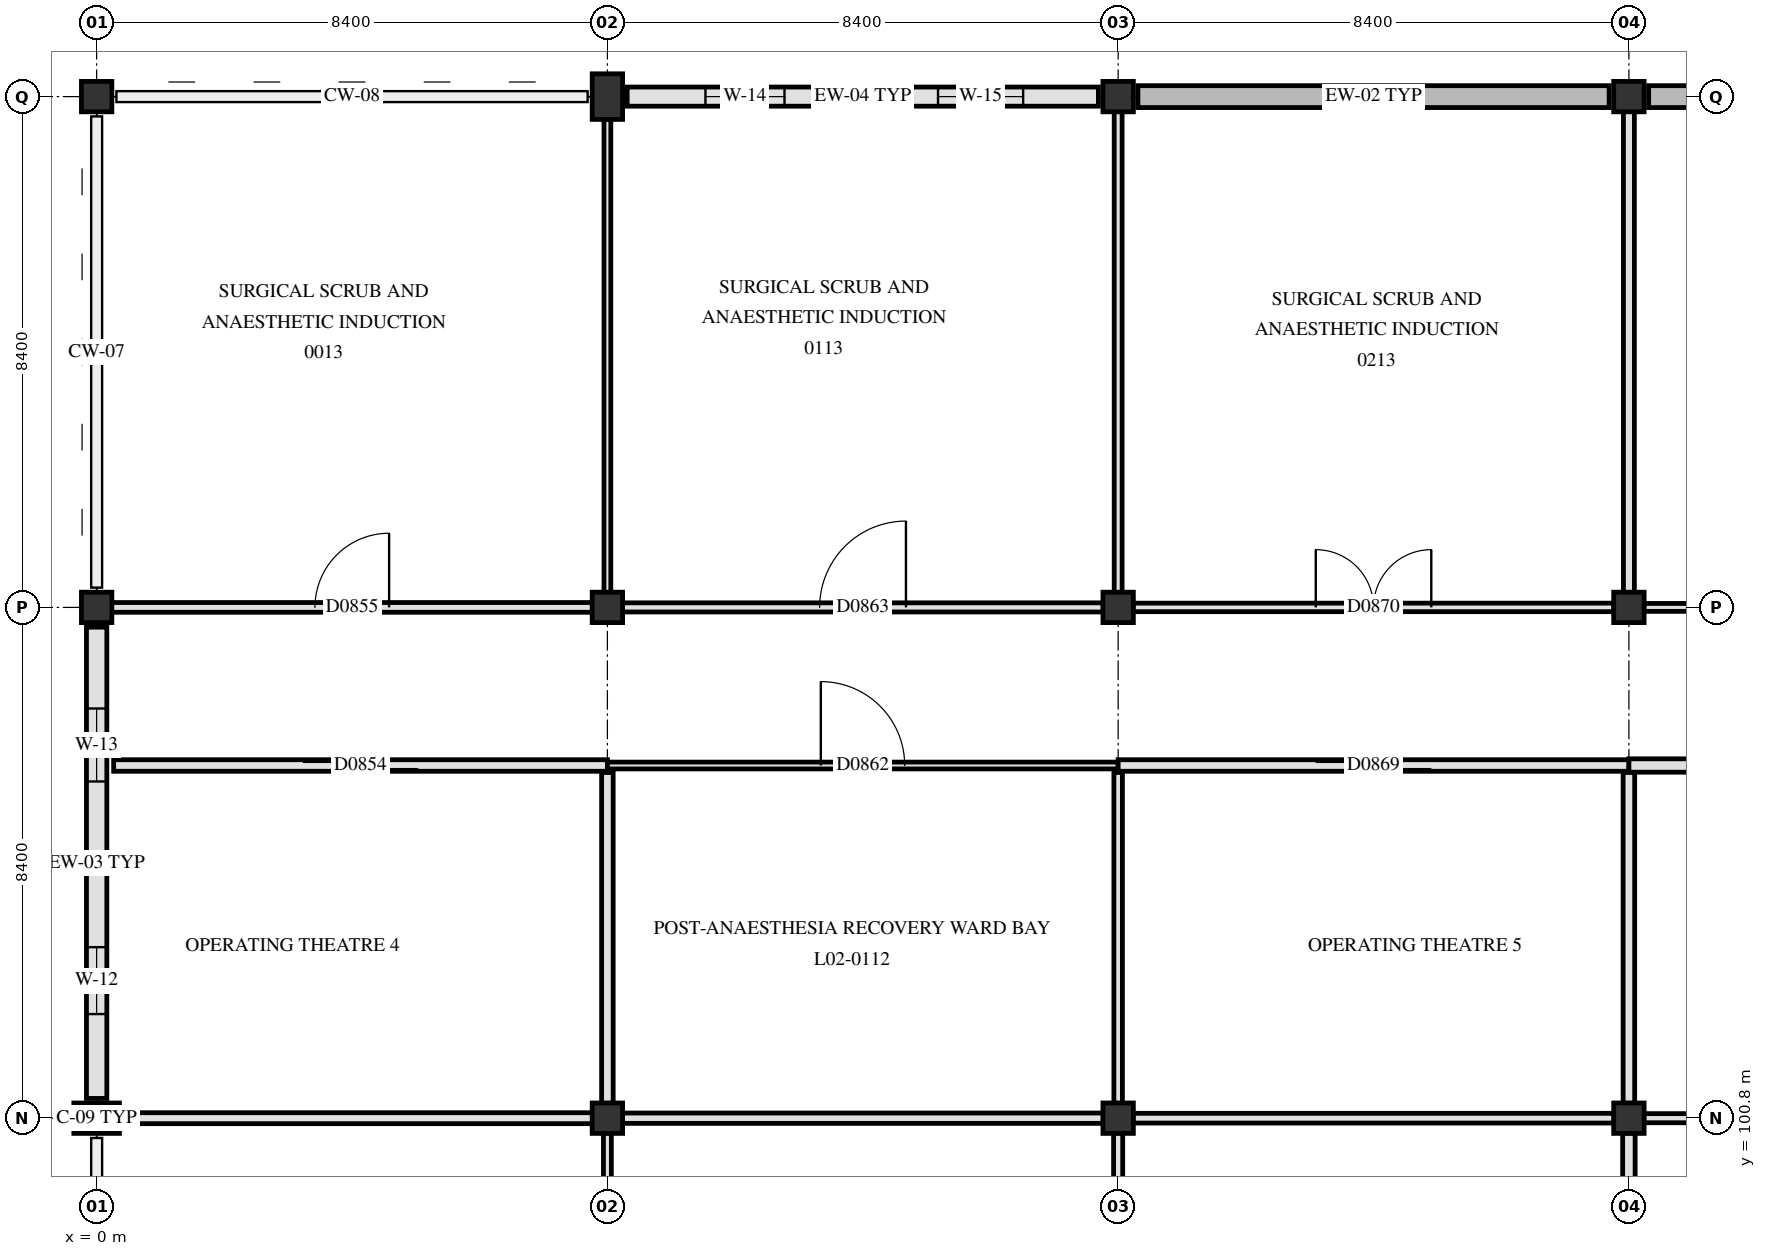
"""IFC4 building model, lengths in metres.
Left out: names, types, materials, properties, quantities, classifications, styles, units other than length and angle.
Written with IfcOpenShell. Run it as: python <this file> out.ifc"""

import sys

from ifc_helpers import new_model, si_unit, direction, frame, frame_2d, origin, origin_2d, place, context, subcontext, project, spatial, rectangle, extrude, element, fill, save


model = new_model("IFC4")
c1 = context("Model", 3, precision=1e-05, world=origin(), true_north=direction((0.0, 1.0)))
c2 = subcontext(c1, "Body", "Model", "MODEL_VIEW")
j1 = project(units=[si_unit("LENGTHUNIT", "METRE"), si_unit("PLANEANGLEUNIT", "RADIAN")], contexts=[c1])
p1 = place(None, origin())
s1 = spatial("IfcSite", under=j1, at=p1, CompositionType="ELEMENT")
p2 = place(p1, origin())
s2 = spatial("IfcBuilding", under=s1, at=p2, CompositionType="ELEMENT")
p3 = place(p2, frame((0.0, 0.0, 9.3)))
s3 = spatial("IfcBuildingStorey", under=s2, at=p3, CompositionType="ELEMENT", Elevation=9.3)
p4 = place(p3, frame((0.0, 100.8, 0.0), z_axis=(0.0, 0.0, 1.0), x_axis=(0.0, 1.0, 0.0)))
e1 = element("IfcColumn", 1, at=p4, inside=s3, PredefinedType="PILASTER", context=c2, shape_type="SweptSolid", body=[
    extrude(rectangle(XDim=0.5, YDim=0.75, at=origin_2d()), origin(), (0.0, 0.0, 1.0), 5.1),
])
for number, where, z_axis, x_axis in (
    (2, (0.0, 109.2, 0.0), (0.0, 0.0, 1.0), (1.0, 0.0, 0.0)),
    (3, (0.0, 117.6, 0.0), (0.0, 0.0, 1.0), (1.0, 0.0, 0.0)),
    (4, (8.4, 100.8, 0.0), (0.0, 0.0, 1.0), (1.0, 0.0, 0.0)),
    (5, (8.4, 109.2, 0.0), (0.0, 0.0, 1.0), (1.0, 0.0, 0.0)),
):
    element("IfcColumn", number, at=place(p3, frame(where, z_axis=z_axis, x_axis=x_axis)), inside=s3, PredefinedType="COLUMN", context=c2, shape_type="SweptSolid", body=[
        extrude(rectangle(XDim=0.5, YDim=0.5, at=origin_2d()), origin(), (0.0, 0.0, 1.0), 5.1),
    ])
p5 = place(p3, frame((8.4, 117.6, 0.0), z_axis=(0.0, 0.0, 1.0), x_axis=(1.0, 0.0, 0.0)))
e6 = element("IfcColumn", 6, at=p5, inside=s3, PredefinedType="PILASTER", context=c2, shape_type="SweptSolid", body=[
    extrude(rectangle(XDim=0.5, YDim=0.75, at=origin_2d()), origin(), (0.0, 0.0, 1.0), 5.1),
])
for number, where, z_axis, x_axis in (
    (7, (16.8, 100.8, 0.0), (0.0, 0.0, 1.0), (1.0, 0.0, 0.0)),
    (8, (16.8, 109.2, 0.0), (0.0, 0.0, 1.0), (1.0, 0.0, 0.0)),
    (9, (16.8, 117.6, 0.0), (0.0, 0.0, 1.0), (1.0, 0.0, 0.0)),
    (10, (25.2, 100.8, 0.0), (0.0, 0.0, 1.0), (1.0, 0.0, 0.0)),
    (11, (25.2, 109.2, 0.0), (0.0, 0.0, 1.0), (1.0, 0.0, 0.0)),
    (12, (25.2, 117.6, 0.0), (0.0, 0.0, 1.0), (1.0, 0.0, 0.0)),
):
    element("IfcColumn", number, at=place(p3, frame(where, z_axis=z_axis, x_axis=x_axis)), inside=s3, PredefinedType="COLUMN", context=c2, shape_type="SweptSolid", body=[
        extrude(rectangle(XDim=0.5, YDim=0.5, at=origin_2d()), origin(), (0.0, 0.0, 1.0), 5.1),
    ])
p6 = place(p3, frame((0.0, 101.125, 0.0), z_axis=(0.0, 0.0, 1.0), x_axis=(0.0, 1.0, 0.0)))
e13 = element("IfcWall", 13, at=p6, inside=s3, PredefinedType="SOLIDWALL", context=c2, shape_type="SweptSolid", body=[
    extrude(rectangle(XDim=7.75, YDim=0.335, at=frame_2d((3.875, 0.0))), origin(), (0.0, 0.0, 1.0), 4.07),
])
p7 = place(p6, frame((1.387, 0.0, 0.85)))
e14 = element("IfcOpeningElement", 14, at=p7, cuts=e13, PredefinedType="OPENING", context=c2, shape_type="SweptSolid", body=[
    extrude(rectangle(XDim=1.1, YDim=1.42, at=frame_2d((0.55, 0.71))), frame((0.0, 0.177, 0.0), z_axis=(0.0, -1.0, 0.0), x_axis=(1.0, 0.0, 0.0)), (0.0, 0.0, 1.0), 0.355),
])
p8 = place(p6, frame((5.212, 0.0, 0.85)))
e15 = element("IfcOpeningElement", 15, at=p8, cuts=e13, PredefinedType="OPENING", context=c2, shape_type="SweptSolid", body=[
    extrude(rectangle(XDim=1.2, YDim=1.42, at=frame_2d((0.6, 0.71))), frame((0.0, 0.177, 0.0), z_axis=(0.0, -1.0, 0.0), x_axis=(1.0, 0.0, 0.0)), (0.0, 0.0, 1.0), 0.355),
])
p9 = place(p3, frame((8.725, 117.6, 0.0), z_axis=(0.0, 0.0, 1.0), x_axis=(1.0, 0.0, 0.0)))
e16 = element("IfcWall", 16, at=p9, inside=s3, PredefinedType="SOLIDWALL", context=c2, shape_type="SweptSolid", body=[
    extrude(rectangle(XDim=7.75, YDim=0.315, at=frame_2d((3.875, 0.0))), origin(), (0.0, 0.0, 1.0), 4.07),
])
p10 = place(p9, frame((1.288, 0.0, 0.85)))
e17 = element("IfcOpeningElement", 17, at=p10, cuts=e16, PredefinedType="OPENING", context=c2, shape_type="SweptSolid", body=[
    extrude(rectangle(XDim=1.3, YDim=1.42, at=frame_2d((0.65, 0.71))), frame((0.0, 0.167, 0.0), z_axis=(0.0, -1.0, 0.0), x_axis=(1.0, 0.0, 0.0)), (0.0, 0.0, 1.0), 0.335),
])
p11 = place(p9, frame((5.113, 0.0, 0.85)))
e18 = element("IfcOpeningElement", 18, at=p11, cuts=e16, PredefinedType="OPENING", context=c2, shape_type="SweptSolid", body=[
    extrude(rectangle(XDim=1.4, YDim=1.42, at=frame_2d((0.7, 0.71))), frame((0.0, 0.167, 0.0), z_axis=(0.0, -1.0, 0.0), x_axis=(1.0, 0.0, 0.0)), (0.0, 0.0, 1.0), 0.335),
])
for number, where, z_axis, x_axis in (
    (19, (17.125, 117.6, 0.0), (0.0, 0.0, 1.0), (1.0, 0.0, 0.0)),
    (20, (25.525, 117.6, 0.0), (0.0, 0.0, 1.0), (1.0, 0.0, 0.0)),
):
    element("IfcWall", number, at=place(p3, frame(where, z_axis=z_axis, x_axis=x_axis)), inside=s3, PredefinedType="SOLIDWALL", context=c2, shape_type="SweptSolid", body=[
        extrude(rectangle(XDim=7.75, YDim=0.36, at=frame_2d((3.875, 0.0))), origin(), (0.0, 0.0, 1.0), 4.78),
    ])
p12 = place(p3, frame((0.245, 100.8, 0.0), z_axis=(0.0, 0.0, 1.0), x_axis=(1.0, 0.0, 0.0)))
e21 = element("IfcWall", 21, at=p12, inside=s3, PredefinedType="PARTITIONING", context=c2, shape_type="SweptSolid", body=[
    extrude(rectangle(XDim=7.91, YDim=0.18, at=frame_2d((3.955, 0.0))), origin(), (0.0, 0.0, 1.0), 4.02),
])
p13 = place(p3, frame((8.645, 100.8, 0.0), z_axis=(0.0, 0.0, 1.0), x_axis=(1.0, 0.0, 0.0)))
e22 = element("IfcWall", 22, at=p13, inside=s3, PredefinedType="PARTITIONING", context=c2, shape_type="SweptSolid", body=[
    extrude(rectangle(XDim=7.91, YDim=0.17, at=frame_2d((3.955, 0.0))), origin(), (0.0, 0.0, 1.0), 4.02),
])
p14 = place(p3, frame((17.045, 100.8, 0.0), z_axis=(0.0, 0.0, 1.0), x_axis=(1.0, 0.0, 0.0)))
e23 = element("IfcWall", 23, at=p14, inside=s3, PredefinedType="PARTITIONING", context=c2, shape_type="SweptSolid", body=[
    extrude(rectangle(XDim=7.91, YDim=0.16, at=frame_2d((3.955, 0.0))), origin(), (0.0, 0.0, 1.0), 4.02),
])
p15 = place(p3, frame((25.445, 100.8, 0.0), z_axis=(0.0, 0.0, 1.0), x_axis=(1.0, 0.0, 0.0)))
e24 = element("IfcWall", 24, at=p15, inside=s3, PredefinedType="PARTITIONING", context=c2, shape_type="SweptSolid", body=[
    extrude(rectangle(XDim=7.91, YDim=0.15, at=frame_2d((3.955, 0.0))), origin(), (0.0, 0.0, 1.0), 4.02),
])
p16 = place(p3, frame((0.28, 106.6, 0.0), z_axis=(0.0, 0.0, 1.0), x_axis=(1.0, 0.0, 0.0)))
e25 = element("IfcWall", 25, at=p16, inside=s3, PredefinedType="PARTITIONING", context=c2, shape_type="SweptSolid", body=[
    extrude(rectangle(XDim=8.12, YDim=0.19, at=frame_2d((4.06, 0.0))), origin(), (0.0, 0.0, 1.0), 4.17),
])
p17 = place(p16, frame((3.11, 0.0, 0.0)))
e26 = element("IfcOpeningElement", 26, at=p17, cuts=e25, PredefinedType="OPENING", context=c2, shape_type="SweptSolid", body=[
    extrude(rectangle(XDim=1.9, YDim=2.3, at=frame_2d((0.95, 1.15))), frame((0.0, 0.105, 0.0), z_axis=(0.0, -1.0, 0.0), x_axis=(1.0, 0.0, 0.0)), (0.0, 0.0, 1.0), 0.21),
])
p18 = place(p3, frame((8.4, 106.6, 0.0), z_axis=(0.0, 0.0, 1.0), x_axis=(1.0, 0.0, 0.0)))
e27 = element("IfcWall", 27, at=p18, inside=s3, PredefinedType="PARTITIONING", context=c2, shape_type="SweptSolid", body=[
    extrude(rectangle(XDim=8.4, YDim=0.112, at=frame_2d((4.2, 0.0))), origin(), (0.0, 0.0, 1.0), 4.17),
])
p19 = place(p18, frame((3.51, 0.0, 0.0)))
e28 = element("IfcOpeningElement", 28, at=p19, cuts=e27, PredefinedType="OPENING", context=c2, shape_type="SweptSolid", body=[
    extrude(rectangle(XDim=1.38, YDim=2.22, at=frame_2d((0.69, 1.11))), frame((0.0, 0.066, 0.0), z_axis=(0.0, -1.0, 0.0), x_axis=(1.0, 0.0, 0.0)), (0.0, 0.0, 1.0), 0.132),
])
p20 = place(p3, frame((16.8, 106.6, 0.0), z_axis=(0.0, 0.0, 1.0), x_axis=(1.0, 0.0, 0.0)))
e29 = element("IfcWall", 29, at=p20, inside=s3, PredefinedType="PARTITIONING", context=c2, shape_type="SweptSolid", body=[
    extrude(rectangle(XDim=8.4, YDim=0.19, at=frame_2d((4.2, 0.0))), origin(), (0.0, 0.0, 1.0), 4.17),
])
p21 = place(p20, frame((3.25, 0.0, 0.0)))
e30 = element("IfcOpeningElement", 30, at=p21, cuts=e29, PredefinedType="OPENING", context=c2, shape_type="SweptSolid", body=[
    extrude(rectangle(XDim=1.9, YDim=2.3, at=frame_2d((0.95, 1.15))), frame((0.0, 0.105, 0.0), z_axis=(0.0, -1.0, 0.0), x_axis=(1.0, 0.0, 0.0)), (0.0, 0.0, 1.0), 0.21),
])
p22 = place(p3, frame((25.2, 106.6, 0.0), z_axis=(0.0, 0.0, 1.0), x_axis=(1.0, 0.0, 0.0)))
e31 = element("IfcWall", 31, at=p22, inside=s3, PredefinedType="PARTITIONING", context=c2, shape_type="SweptSolid", body=[
    extrude(rectangle(XDim=5.95, YDim=0.22, at=frame_2d((2.975, 0.0))), origin(), (0.0, 0.0, 1.0), 4.17),
])
p23 = place(p22, frame((2.375, 0.0, 0.0)))
e32 = element("IfcOpeningElement", 32, at=p23, cuts=e31, PredefinedType="OPENING", context=c2, shape_type="SweptSolid", body=[
    extrude(rectangle(XDim=1.2, YDim=2.15, at=frame_2d((0.6, 1.075))), frame((0.0, 0.12, 0.0), z_axis=(0.0, -1.0, 0.0), x_axis=(1.0, 0.0, 0.0)), (0.0, 0.0, 1.0), 0.24),
])
p24 = place(p3, frame((0.245, 109.2, 0.0), z_axis=(0.0, 0.0, 1.0), x_axis=(1.0, 0.0, 0.0)))
e33 = element("IfcWall", 33, at=p24, inside=s3, PredefinedType="PARTITIONING", context=c2, shape_type="SweptSolid", body=[
    extrude(rectangle(XDim=7.91, YDim=0.16, at=frame_2d((3.955, 0.0))), origin(), (0.0, 0.0, 1.0), 4.02),
])
p25 = place(p24, frame((3.345, 0.0, 0.0)))
e34 = element("IfcOpeningElement", 34, at=p25, cuts=e33, PredefinedType="OPENING", context=c2, shape_type="SweptSolid", body=[
    extrude(rectangle(XDim=1.22, YDim=2.18, at=frame_2d((0.61, 1.09))), frame((0.0, 0.09, 0.0), z_axis=(0.0, -1.0, 0.0), x_axis=(1.0, 0.0, 0.0)), (0.0, 0.0, 1.0), 0.18),
])
p26 = place(p3, frame((8.645, 109.2, 0.0), z_axis=(0.0, 0.0, 1.0), x_axis=(1.0, 0.0, 0.0)))
e35 = element("IfcWall", 35, at=p26, inside=s3, PredefinedType="PARTITIONING", context=c2, shape_type="SweptSolid", body=[
    extrude(rectangle(XDim=7.91, YDim=0.15, at=frame_2d((3.955, 0.0))), origin(), (0.0, 0.0, 1.0), 4.02),
])
p27 = place(p26, frame((3.245, 0.0, 0.0)))
e36 = element("IfcOpeningElement", 36, at=p27, cuts=e35, PredefinedType="OPENING", context=c2, shape_type="SweptSolid", body=[
    extrude(rectangle(XDim=1.42, YDim=2.22, at=frame_2d((0.71, 1.11))), frame((0.0, 0.085, 0.0), z_axis=(0.0, -1.0, 0.0), x_axis=(1.0, 0.0, 0.0)), (0.0, 0.0, 1.0), 0.17),
])
p28 = place(p3, frame((17.045, 109.2, 0.0), z_axis=(0.0, 0.0, 1.0), x_axis=(1.0, 0.0, 0.0)))
e37 = element("IfcWall", 37, at=p28, inside=s3, PredefinedType="PARTITIONING", context=c2, shape_type="SweptSolid", body=[
    extrude(rectangle(XDim=7.91, YDim=0.14, at=frame_2d((3.955, 0.0))), origin(), (0.0, 0.0, 1.0), 4.02),
])
p29 = place(p28, frame((3.005, 0.0, 0.0)))
e38 = element("IfcOpeningElement", 38, at=p29, cuts=e37, PredefinedType="OPENING", context=c2, shape_type="SweptSolid", body=[
    extrude(rectangle(XDim=1.9, YDim=2.3, at=frame_2d((0.95, 1.15))), frame((0.0, 0.08, 0.0), z_axis=(0.0, -1.0, 0.0), x_axis=(1.0, 0.0, 0.0)), (0.0, 0.0, 1.0), 0.16),
])
p30 = place(p3, frame((25.445, 109.2, 0.0), z_axis=(0.0, 0.0, 1.0), x_axis=(1.0, 0.0, 0.0)))
e39 = element("IfcWall", 39, at=p30, inside=s3, PredefinedType="PARTITIONING", context=c2, shape_type="SweptSolid", body=[
    extrude(rectangle(XDim=5.705, YDim=0.13, at=frame_2d((2.853, 0.0))), origin(), (0.0, 0.0, 1.0), 4.02),
])
p31 = place(p30, frame((2.228, 0.0, 0.0)))
e40 = element("IfcOpeningElement", 40, at=p31, cuts=e39, PredefinedType="OPENING", context=c2, shape_type="SweptSolid", body=[
    extrude(rectangle(XDim=1.25, YDim=2.2, at=frame_2d((0.625, 1.1))), frame((0.0, 0.075, 0.0), z_axis=(0.0, -1.0, 0.0), x_axis=(1.0, 0.0, 0.0)), (0.0, 0.0, 1.0), 0.15),
])
p32 = place(p3, frame((8.4, 95.115, 0.0), z_axis=(0.0, 0.0, 1.0), x_axis=(0.0, 1.0, 0.0)))
e41 = element("IfcWall", 41, at=p32, inside=s3, PredefinedType="PARTITIONING", context=c2, shape_type="SweptSolid", body=[
    extrude(rectangle(XDim=5.44, YDim=0.13, at=frame_2d((2.72, 0.0))), origin(), (0.0, 0.0, 1.0), 4.17),
])
p33 = place(p3, frame((8.4, 101.045, 0.0), z_axis=(0.0, 0.0, 1.0), x_axis=(0.0, 1.0, 0.0)))
e42 = element("IfcWall", 42, at=p33, inside=s3, PredefinedType="PARTITIONING", context=c2, shape_type="SweptSolid", body=[
    extrude(rectangle(XDim=5.44, YDim=0.19, at=frame_2d((2.72, 0.0))), origin(), (0.0, 0.0, 1.0), 4.17),
])
p34 = place(p3, frame((8.4, 109.445, 0.0), z_axis=(0.0, 0.0, 1.0), x_axis=(0.0, 1.0, 0.0)))
e43 = element("IfcWall", 43, at=p34, inside=s3, PredefinedType="PARTITIONING", context=c2, shape_type="SweptSolid", body=[
    extrude(rectangle(XDim=7.785, YDim=0.112, at=frame_2d((3.893, 0.0))), origin(), (0.0, 0.0, 1.0), 4.17),
])
p35 = place(p3, frame((16.8, 95.115, 0.0), z_axis=(0.0, 0.0, 1.0), x_axis=(0.0, 1.0, 0.0)))
e44 = element("IfcWall", 44, at=p35, inside=s3, PredefinedType="PARTITIONING", context=c2, shape_type="SweptSolid", body=[
    extrude(rectangle(XDim=5.44, YDim=0.15, at=frame_2d((2.72, 0.0))), origin(), (0.0, 0.0, 1.0), 4.17),
])
p36 = place(p3, frame((16.8, 101.045, 0.0), z_axis=(0.0, 0.0, 1.0), x_axis=(0.0, 1.0, 0.0)))
e45 = element("IfcWall", 45, at=p36, inside=s3, PredefinedType="PARTITIONING", context=c2, shape_type="SweptSolid", body=[
    extrude(rectangle(XDim=5.44, YDim=0.14, at=frame_2d((2.72, 0.0))), origin(), (0.0, 0.0, 1.0), 4.17),
])
p37 = place(p3, frame((16.8, 109.445, 0.0), z_axis=(0.0, 0.0, 1.0), x_axis=(0.0, 1.0, 0.0)))
e46 = element("IfcWall", 46, at=p37, inside=s3, PredefinedType="PARTITIONING", context=c2, shape_type="SweptSolid", body=[
    extrude(rectangle(XDim=7.91, YDim=0.13, at=frame_2d((3.955, 0.0))), origin(), (0.0, 0.0, 1.0), 4.17),
])
p38 = place(p3, frame((25.2, 95.115, 0.0), z_axis=(0.0, 0.0, 1.0), x_axis=(0.0, 1.0, 0.0)))
e47 = element("IfcWall", 47, at=p38, inside=s3, PredefinedType="PARTITIONING", context=c2, shape_type="SweptSolid", body=[
    extrude(rectangle(XDim=5.44, YDim=0.205, at=frame_2d((2.72, 0.0))), origin(), (0.0, 0.0, 1.0), 4.17),
])
p39 = place(p3, frame((25.2, 101.045, 0.0), z_axis=(0.0, 0.0, 1.0), x_axis=(0.0, 1.0, 0.0)))
e48 = element("IfcWall", 48, at=p39, inside=s3, PredefinedType="PARTITIONING", context=c2, shape_type="SweptSolid", body=[
    extrude(rectangle(XDim=5.44, YDim=0.19, at=frame_2d((2.72, 0.0))), origin(), (0.0, 0.0, 1.0), 4.17),
])
p40 = place(p3, frame((25.2, 109.445, 0.0), z_axis=(0.0, 0.0, 1.0), x_axis=(0.0, 1.0, 0.0)))
e49 = element("IfcWall", 49, at=p40, inside=s3, PredefinedType="PARTITIONING", context=c2, shape_type="SweptSolid", body=[
    extrude(rectangle(XDim=7.91, YDim=0.18, at=frame_2d((3.955, 0.0))), origin(), (0.0, 0.0, 1.0), 4.17),
])
p41 = place(p7, origin())
e50 = element("IfcWindow", 50, at=p41, inside=s3, PartitioningType="SINGLE_PANEL", PredefinedType="WINDOW", context=c2, shape_type="SweptSolid", body=[
    extrude(rectangle(XDim=1.1, YDim=1.42, at=frame_2d((0.55, 0.71))), frame((0.0, 0.03, 0.0), z_axis=(0.0, -1.0, 0.0), x_axis=(1.0, 0.0, 0.0)), (0.0, 0.0, 1.0), 0.06),
])
fill(e14, e50)
p42 = place(p8, origin())
e51 = element("IfcWindow", 51, at=p42, inside=s3, PartitioningType="SINGLE_PANEL", PredefinedType="WINDOW", context=c2, shape_type="SweptSolid", body=[
    extrude(rectangle(XDim=1.2, YDim=1.42, at=frame_2d((0.6, 0.71))), frame((0.0, 0.03, 0.0), z_axis=(0.0, -1.0, 0.0), x_axis=(1.0, 0.0, 0.0)), (0.0, 0.0, 1.0), 0.06),
])
fill(e15, e51)
p43 = place(p10, origin())
e52 = element("IfcWindow", 52, at=p43, inside=s3, PartitioningType="SINGLE_PANEL", PredefinedType="WINDOW", context=c2, shape_type="SweptSolid", body=[
    extrude(rectangle(XDim=1.3, YDim=1.42, at=frame_2d((0.65, 0.71))), frame((0.0, 0.03, 0.0), z_axis=(0.0, -1.0, 0.0), x_axis=(1.0, 0.0, 0.0)), (0.0, 0.0, 1.0), 0.06),
])
fill(e17, e52)
p44 = place(p11, origin())
e53 = element("IfcWindow", 53, at=p44, inside=s3, PartitioningType="SINGLE_PANEL", PredefinedType="WINDOW", context=c2, shape_type="SweptSolid", body=[
    extrude(rectangle(XDim=1.4, YDim=1.42, at=frame_2d((0.7, 0.71))), frame((0.0, 0.03, 0.0), z_axis=(0.0, -1.0, 0.0), x_axis=(1.0, 0.0, 0.0)), (0.0, 0.0, 1.0), 0.06),
])
fill(e18, e53)
p45 = place(p17, origin())
e54 = element("IfcDoor", 54, at=p45, inside=s3, OperationType="SLIDING_TO_LEFT", PredefinedType="DOOR", context=c2, shape_type="SweptSolid", body=[
    extrude(rectangle(XDim=1.9, YDim=2.3, at=frame_2d((0.95, 1.15))), frame((0.0, 0.025, 0.0), z_axis=(0.0, -1.0, 0.0), x_axis=(1.0, 0.0, 0.0)), (0.0, 0.0, 1.0), 0.05),
])
fill(e26, e54)
p46 = place(p25, origin())
e55 = element("IfcDoor", 55, at=p46, inside=s3, OperationType="SINGLE_SWING_RIGHT", PredefinedType="DOOR", context=c2, shape_type="SweptSolid", body=[
    extrude(rectangle(XDim=1.22, YDim=2.18, at=frame_2d((0.61, 1.09))), frame((0.0, 0.025, 0.0), z_axis=(0.0, -1.0, 0.0), x_axis=(1.0, 0.0, 0.0)), (0.0, 0.0, 1.0), 0.05),
])
fill(e34, e55)
p47 = place(p19, origin())
e56 = element("IfcDoor", 56, at=p47, inside=s3, OperationType="SINGLE_SWING_LEFT", PredefinedType="DOOR", context=c2, shape_type="SweptSolid", body=[
    extrude(rectangle(XDim=1.38, YDim=2.22, at=frame_2d((0.69, 1.11))), frame((0.0, 0.025, 0.0), z_axis=(0.0, -1.0, 0.0), x_axis=(1.0, 0.0, 0.0)), (0.0, 0.0, 1.0), 0.05),
])
fill(e28, e56)
p48 = place(p27, origin())
e57 = element("IfcDoor", 57, at=p48, inside=s3, OperationType="SINGLE_SWING_RIGHT", PredefinedType="DOOR", context=c2, shape_type="SweptSolid", body=[
    extrude(rectangle(XDim=1.42, YDim=2.22, at=frame_2d((0.71, 1.11))), frame((0.0, 0.025, 0.0), z_axis=(0.0, -1.0, 0.0), x_axis=(1.0, 0.0, 0.0)), (0.0, 0.0, 1.0), 0.05),
])
fill(e36, e57)
p49 = place(p21, origin())
e58 = element("IfcDoor", 58, at=p49, inside=s3, OperationType="SLIDING_TO_LEFT", PredefinedType="DOOR", context=c2, shape_type="SweptSolid", body=[
    extrude(rectangle(XDim=1.9, YDim=2.3, at=frame_2d((0.95, 1.15))), frame((0.0, 0.025, 0.0), z_axis=(0.0, -1.0, 0.0), x_axis=(1.0, 0.0, 0.0)), (0.0, 0.0, 1.0), 0.05),
])
fill(e30, e58)
p50 = place(p29, origin())
e59 = element("IfcDoor", 59, at=p50, inside=s3, OperationType="DOUBLE_SWING_LEFT", PredefinedType="DOOR", context=c2, shape_type="SweptSolid", body=[
    extrude(rectangle(XDim=1.9, YDim=2.3, at=frame_2d((0.95, 1.15))), frame((0.0, 0.025, 0.0), z_axis=(0.0, -1.0, 0.0), x_axis=(1.0, 0.0, 0.0)), (0.0, 0.0, 1.0), 0.05),
])
fill(e38, e59)
save(model, sys.argv[1])
